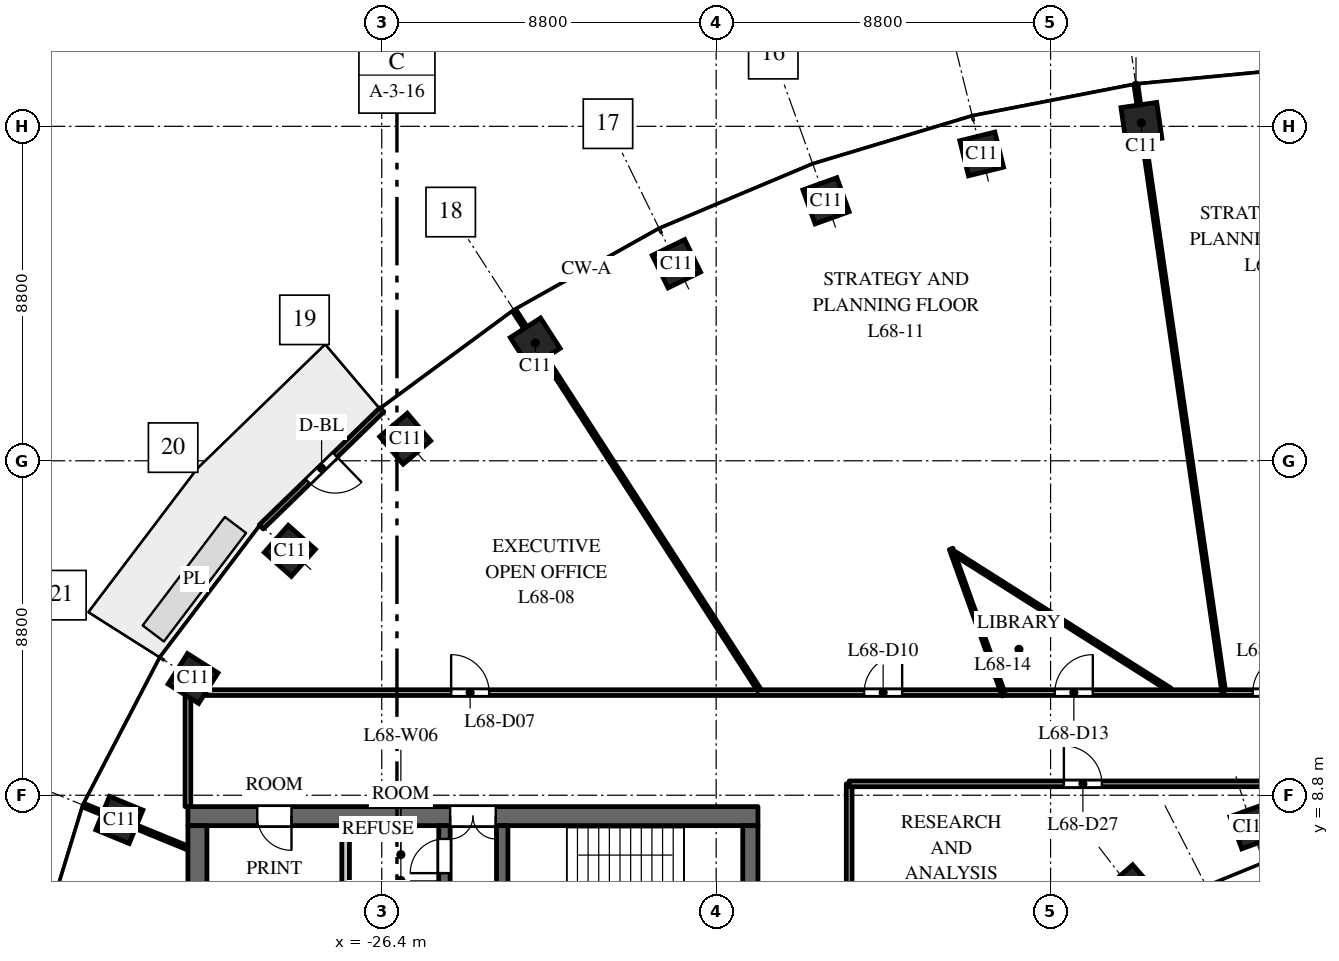
"""IFC4 building model, lengths in metres.
Left out: names, types, materials, properties, quantities, classifications, styles, units other than length and angle.
Written with IfcOpenShell. Run it as: python <this file> out.ifc"""

import sys

from ifc_helpers import new_model, si_unit, direction, frame, frame_2d, origin, origin_2d, place, context, subcontext, project, spatial, rectangle, extrude, element, fill, save


model = new_model("IFC4")
c1 = context("Model", 3, precision=1e-05, world=origin(), true_north=direction((0.0, 1.0)))
c2 = subcontext(c1, "Body", "Model", "MODEL_VIEW")
j1 = project(units=[si_unit("LENGTHUNIT", "METRE"), si_unit("PLANEANGLEUNIT", "RADIAN")], contexts=[c1])
p1 = place(None, origin())
s1 = spatial("IfcSite", under=j1, at=p1, CompositionType="ELEMENT")
p2 = place(p1, origin())
s2 = spatial("IfcBuilding", under=s1, at=p2, CompositionType="ELEMENT")
p3 = place(p2, frame((0.0, 0.0, 315.0)))
s3 = spatial("IfcBuildingStorey", under=s2, at=p3, CompositionType="ELEMENT", Elevation=315.0)
for number, where, z_axis, x_axis in (
    (1, (-6.409, 26.491, 0.0), (0.0, 0.0, 1.0), (-0.99, -0.143, 0.0)),
    (2, (-10.613, 25.674, 0.0), (0.0, 0.0, 1.0), (-0.971, -0.24, 0.0)),
    (3, (-14.709, 24.441, 0.0), (0.0, 0.0, 1.0), (-0.941, -0.338, 0.0)),
    (4, (-18.646, 22.785, 0.0), (0.0, 0.0, 1.0), (-0.898, -0.439, 0.0)),
    (5, (-22.362, 20.7, 0.0), (0.0, 0.0, 1.0), (-0.84, -0.542, 0.0)),
    (6, (-25.783, 18.18, 0.0), (0.0, 0.0, 1.0), (-0.763, -0.646, 0.0)),
    (7, (-28.819, 15.23, 0.0), (0.0, 0.0, 1.0), (-0.663, -0.749, 0.0)),
    (8, (-31.365, 11.871, 0.0), (0.0, 0.0, 1.0), (-0.535, -0.845, 0.0)),
    (9, (-33.305, 8.149, 0.0), (0.0, 0.0, 1.0), (-0.379, -0.925, 0.0)),
):
    element("IfcColumn", number, at=place(p3, frame(where, z_axis=z_axis, x_axis=x_axis)), inside=s3, PredefinedType="COLUMN", context=c2, shape_type="SweptSolid", body=[
        extrude(rectangle(XDim=0.95, YDim=0.95, at=origin_2d()), origin(), (0.0, 0.0, 1.0), 4.0),
    ])
for number, where, z_axis, x_axis in (
    (10, (-3.501, 7.967, 0.0), (0.0, 0.0, 1.0), (-0.939, -0.344, 0.0)),
    (11, (-6.682, 6.334, 0.0), (0.0, 0.0, 1.0), (-0.751, -0.66, 0.0)),
):
    element("IfcColumn", number, at=place(p3, frame(where, z_axis=z_axis, x_axis=x_axis)), inside=s3, PredefinedType="COLUMN", context=c2, shape_type="SweptSolid", body=[
        extrude(rectangle(XDim=0.9, YDim=0.9, at=origin_2d()), origin(), (0.0, 0.0, 1.0), 4.0),
    ])
p4 = place(p3, frame((-16.5, 8.25, 0.0), z_axis=(0.0, 0.0, 1.0), x_axis=(-1.0, 0.0, 0.0)))
e12 = element("IfcWall", 12, at=p4, inside=s3, PredefinedType="SHEAR", context=c2, shape_type="SweptSolid", body=[
    extrude(rectangle(XDim=15.0, YDim=0.5, at=frame_2d((7.5, 0.0))), origin(), (0.0, 0.0, 1.0), 3.7),
])
p5 = place(p4, frame((6.9, 0.0, 0.0)))
e13 = element("IfcOpeningElement", 13, at=p5, cuts=e12, PredefinedType="OPENING", context=c2, shape_type="SweptSolid", body=[
    extrude(rectangle(XDim=1.2, YDim=2.1, at=frame_2d((0.6, 1.05))), frame((0.0, 0.26, 0.0), z_axis=(0.0, -1.0, 0.0), x_axis=(1.0, 0.0, 0.0)), (0.0, 0.0, 1.0), 0.52),
])
p6 = place(p4, frame((12.275, 0.0, 0.0)))
e14 = element("IfcOpeningElement", 14, at=p6, cuts=e12, PredefinedType="OPENING", context=c2, shape_type="SweptSolid", body=[
    extrude(rectangle(XDim=0.9, YDim=2.1, at=frame_2d((0.45, 1.05))), frame((0.0, 0.26, 0.0), z_axis=(0.0, -1.0, 0.0), x_axis=(1.0, 0.0, 0.0)), (0.0, 0.0, 1.0), 0.52),
])
p7 = place(p3, frame((-24.75, -8.0, 0.0), z_axis=(0.0, 0.0, 1.0), x_axis=(0.0, 1.0, 0.0)))
e15 = element("IfcWall", 15, at=p7, inside=s3, PredefinedType="SHEAR", context=c2, shape_type="SweptSolid", body=[
    extrude(rectangle(XDim=16.0, YDim=0.3, at=frame_2d((8.0, 0.0))), origin(), (0.0, 0.0, 1.0), 3.7),
])
p8 = place(p7, frame((4.425, 0.0, 0.0)))
e16 = element("IfcOpeningElement", 16, at=p8, cuts=e15, PredefinedType="OPENING", context=c2, shape_type="SweptSolid", body=[
    extrude(rectangle(XDim=1.1, YDim=2.1, at=frame_2d((0.55, 1.05))), frame((0.0, 0.16, 0.0), z_axis=(0.0, -1.0, 0.0), x_axis=(1.0, 0.0, 0.0)), (0.0, 0.0, 1.0), 0.32),
])
p9 = place(p7, frame((7.45, 0.0, 0.0)))
e17 = element("IfcOpeningElement", 17, at=p9, cuts=e15, PredefinedType="OPENING", context=c2, shape_type="SweptSolid", body=[
    extrude(rectangle(XDim=1.1, YDim=2.1, at=frame_2d((0.55, 1.05))), frame((0.0, 0.16, 0.0), z_axis=(0.0, -1.0, 0.0), x_axis=(1.0, 0.0, 0.0)), (0.0, 0.0, 1.0), 0.32),
])
p10 = place(p7, frame((10.575, 0.0, 0.0)))
e18 = element("IfcOpeningElement", 18, at=p10, cuts=e15, PredefinedType="OPENING", context=c2, shape_type="SweptSolid", body=[
    extrude(rectangle(XDim=0.9, YDim=2.1, at=frame_2d((0.45, 1.05))), frame((0.0, 0.16, 0.0), z_axis=(0.0, -1.0, 0.0), x_axis=(1.0, 0.0, 0.0)), (0.0, 0.0, 1.0), 0.32),
])
p11 = place(p7, frame((13.125, 0.0, 0.0)))
e19 = element("IfcOpeningElement", 19, at=p11, cuts=e15, PredefinedType="OPENING", context=c2, shape_type="SweptSolid", body=[
    extrude(rectangle(XDim=0.9, YDim=2.1, at=frame_2d((0.45, 1.05))), frame((0.0, 0.16, 0.0), z_axis=(0.0, -1.0, 0.0), x_axis=(1.0, 0.0, 0.0)), (0.0, 0.0, 1.0), 0.32),
])
p12 = place(p7, frame((14.75, 0.0, 0.0)))
e20 = element("IfcOpeningElement", 20, at=p12, cuts=e15, PredefinedType="OPENING", context=c2, shape_type="SweptSolid", body=[
    extrude(rectangle(XDim=0.9, YDim=2.1, at=frame_2d((0.45, 1.05))), frame((0.0, 0.16, 0.0), z_axis=(0.0, -1.0, 0.0), x_axis=(1.0, 0.0, 0.0)), (0.0, 0.0, 1.0), 0.32),
])
p13 = place(p7, frame((1.35, 0.0, 0.0)))
e21 = element("IfcOpeningElement", 21, at=p13, cuts=e15, PredefinedType="OPENING", context=c2, shape_type="SweptSolid", body=[
    extrude(rectangle(XDim=0.9, YDim=2.1, at=frame_2d((0.45, 1.05))), frame((0.0, 0.16, 0.0), z_axis=(0.0, -1.0, 0.0), x_axis=(1.0, 0.0, 0.0)), (0.0, 0.0, 1.0), 0.32),
])
p14 = place(p3, frame((-16.7, -8.0, 0.0), z_axis=(0.0, 0.0, 1.0), x_axis=(0.0, 1.0, 0.0)))
e22 = element("IfcWall", 22, at=p14, inside=s3, PredefinedType="SHEAR", context=c2, shape_type="SweptSolid", body=[
    extrude(rectangle(XDim=16.0, YDim=0.4, at=frame_2d((8.0, 0.0))), origin(), (0.0, 0.0, 1.0), 3.7),
])
p15 = place(p3, frame((-31.25, -8.0, 0.0), z_axis=(0.0, 0.0, 1.0), x_axis=(0.0, 1.0, 0.0)))
e23 = element("IfcWall", 23, at=p15, inside=s3, PredefinedType="SHEAR", context=c2, shape_type="SweptSolid", body=[
    extrude(rectangle(XDim=16.0, YDim=0.5, at=frame_2d((8.0, 0.0))), origin(), (0.0, 0.0, 1.0), 3.7),
])
p16 = place(p3, frame((-27.35, 4.75, 0.0), z_axis=(0.0, 0.0, 1.0), x_axis=(0.0, 1.0, 0.0)))
e24 = element("IfcWall", 24, at=p16, inside=s3, PredefinedType="PARTITIONING", context=c2, shape_type="SweptSolid", body=[
    extrude(rectangle(XDim=3.25, YDim=0.2, at=frame_2d((1.625, 0.0))), origin(), (0.0, 0.0, 1.0), 3.7),
])
p17 = place(p3, frame((-23.23, 2.25, 0.0), z_axis=(0.0, 0.0, 1.0), x_axis=(0.0, 1.0, 0.0)))
e25 = element("IfcWall", 25, at=p17, inside=s3, PredefinedType="SHEAR", context=c2, shape_type="SweptSolid", body=[
    extrude(rectangle(XDim=5.75, YDim=0.3, at=frame_2d((2.875, 0.0))), origin(), (0.0, 0.0, 1.0), 3.7),
])
p18 = place(p17, frame((0.6, 0.0, 0.0)))
e26 = element("IfcOpeningElement", 26, at=p18, cuts=e25, PredefinedType="OPENING", context=c2, shape_type="SweptSolid", body=[
    extrude(rectangle(XDim=1.0, YDim=2.1, at=frame_2d((0.5, 1.05))), frame((0.0, 0.16, 0.0), z_axis=(0.0, -1.0, 0.0), x_axis=(1.0, 0.0, 0.0)), (0.0, 0.0, 1.0), 0.32),
])
p19 = place(p3, frame((-26.396, 18.943, 0.0), z_axis=(0.0, 0.0, 1.0), x_axis=(-0.717214761864, -0.696852197647, 0.0)))
e27 = element("IfcWall", 27, at=p19, inside=s3, PredefinedType="STANDARD", context=c2, shape_type="SweptSolid", body=[
    extrude(rectangle(XDim=4.424, YDim=0.15, at=frame_2d((2.212, 0.0))), origin(), (0.0, 0.0, 1.0), 3.7),
])
p20 = place(p19, frame((1.712, 0.0, 0.0)))
e28 = element("IfcOpeningElement", 28, at=p20, cuts=e27, PredefinedType="OPENING", context=c2, shape_type="SweptSolid", body=[
    extrude(rectangle(XDim=1.0, YDim=2.4, at=frame_2d((0.5, 1.2))), frame((0.0, 0.085, 0.0), z_axis=(0.0, -1.0, 0.0), x_axis=(1.0, 0.0, 0.0)), (0.0, 0.0, 1.0), 0.17),
])
p21 = place(p3, frame((-34.234, 8.53, 0.0), z_axis=(0.0, 0.0, 1.0), x_axis=(0.925344112436, -0.379128307542, 0.0)))
e29 = element("IfcWall", 29, at=p21, inside=s3, PredefinedType="PARTITIONING", context=c2, shape_type="SweptSolid", body=[
    extrude(rectangle(XDim=2.954, YDim=0.1, at=frame_2d((1.477, 0.0))), origin(), (0.0, 0.0, 1.0), 3.0),
])
p22 = place(p3, frame((-31.5, 8.5, 0.0), z_axis=(0.0, 0.0, 1.0), x_axis=(0.0, 1.0, 0.0)))
e30 = element("IfcWall", 30, at=p22, inside=s3, PredefinedType="PARTITIONING", context=c2, shape_type="SweptSolid", body=[
    extrude(rectangle(XDim=3.0, YDim=0.15, at=frame_2d((1.5, 0.0))), origin(), (0.0, 0.0, 1.0), 3.0),
])
p23 = place(p3, frame((-31.5, 11.5, 0.0), z_axis=(0.0, 0.0, 1.0), x_axis=(1.0, 0.0, 0.0)))
e31 = element("IfcWall", 31, at=p23, inside=s3, PredefinedType="PARTITIONING", context=c2, shape_type="SweptSolid", body=[
    extrude(rectangle(XDim=21.432, YDim=0.15, at=frame_2d((10.716, 0.0))), origin(), (0.0, 0.0, 1.0), 2.75),
])
p24 = place(p23, frame((6.926, 0.0, 0.0)))
e32 = element("IfcOpeningElement", 32, at=p24, cuts=e31, PredefinedType="OPENING", context=c2, shape_type="SweptSolid", body=[
    extrude(rectangle(XDim=1.0, YDim=2.1, at=frame_2d((0.5, 1.05))), frame((0.0, 0.085, 0.0), z_axis=(0.0, -1.0, 0.0), x_axis=(1.0, 0.0, 0.0)), (0.0, 0.0, 1.0), 0.17),
])
p25 = place(p23, frame((17.794, 0.0, 0.0)))
e33 = element("IfcOpeningElement", 33, at=p25, cuts=e31, PredefinedType="OPENING", context=c2, shape_type="SweptSolid", body=[
    extrude(rectangle(XDim=1.0, YDim=2.1, at=frame_2d((0.5, 1.05))), frame((0.0, 0.085, 0.0), z_axis=(0.0, -1.0, 0.0), x_axis=(1.0, 0.0, 0.0)), (0.0, 0.0, 1.0), 0.17),
])
p26 = place(p3, frame((-22.905, 21.542, 0.0), z_axis=(0.0, 0.0, 1.0), x_axis=(0.54229092728, -0.840190782019, 0.0)))
e34 = element("IfcWall", 34, at=p26, inside=s3, PredefinedType="PARTITIONING", context=c2, shape_type="SweptSolid", body=[
    extrude(rectangle(XDim=11.863, YDim=0.1, at=frame_2d((5.931, 0.0))), origin(), (0.0, 0.0, 1.0), 2.75),
])
p27 = place(p3, frame((-14.1, 4.55, 0.0), z_axis=(0.0, 0.0, 1.0), x_axis=(0.0, 1.0, 0.0)))
e35 = element("IfcWall", 35, at=p27, inside=s3, PredefinedType="PARTITIONING", context=c2, shape_type="SweptSolid", body=[
    extrude(rectangle(XDim=4.55, YDim=0.15, at=frame_2d((2.275, 0.0))), origin(), (0.0, 0.0, 1.0), 3.7),
])
p28 = place(p3, frame((-14.1, 9.1, 0.0), z_axis=(0.0, 0.0, 1.0), x_axis=(1.0, 0.0, 0.0)))
e36 = element("IfcWall", 36, at=p28, inside=s3, PredefinedType="PARTITIONING", context=c2, shape_type="SweptSolid", body=[
    extrude(rectangle(XDim=12.3, YDim=0.15, at=frame_2d((6.15, 0.0))), origin(), (0.0, 0.0, 1.0), 2.75),
])
p29 = place(p28, frame((5.65, 0.0, 0.0)))
e37 = element("IfcOpeningElement", 37, at=p29, cuts=e36, PredefinedType="OPENING", context=c2, shape_type="SweptSolid", body=[
    extrude(rectangle(XDim=1.0, YDim=2.1, at=frame_2d((0.5, 1.05))), frame((0.0, 0.085, 0.0), z_axis=(0.0, -1.0, 0.0), x_axis=(1.0, 0.0, 0.0)), (0.0, 0.0, 1.0), 0.17),
])
p30 = place(p3, frame((-11.416, 15.282, 0.0), z_axis=(0.0, 0.0, 1.0), x_axis=(0.33848088015, -0.940973269425, 0.0)))
e38 = element("IfcWall", 38, at=p30, inside=s3, PredefinedType="PARTITIONING", context=c2, shape_type="SweptSolid", body=[
    extrude(rectangle(XDim=4.095, YDim=0.1, at=frame_2d((2.047, 0.0))), origin(), (0.0, 0.0, 1.0), 2.75),
])
p31 = place(p3, frame((-11.319, 15.161, 0.0), z_axis=(0.0, 0.0, 1.0), x_axis=(0.844865171483, -0.534979291203, 0.0)))
e39 = element("IfcWall", 39, at=p31, inside=s3, PredefinedType="PARTITIONING", context=c2, shape_type="SweptSolid", body=[
    extrude(rectangle(XDim=6.703, YDim=0.1, at=frame_2d((3.352, 0.0))), origin(), (0.0, 0.0, 1.0), 3.7),
])
p32 = place(p3, frame((-10.003, 11.5, 0.0), z_axis=(0.0, 0.0, 1.0), x_axis=(1.0, 0.0, 0.0)))
e40 = element("IfcWall", 40, at=p32, inside=s3, PredefinedType="PARTITIONING", context=c2, shape_type="SweptSolid", body=[
    extrude(rectangle(XDim=5.741, YDim=0.15, at=frame_2d((2.871, 0.0))), origin(), (0.0, 0.0, 1.0), 2.75),
])
p33 = place(p32, frame((1.315, 0.0, 0.0)))
e41 = element("IfcOpeningElement", 41, at=p33, cuts=e40, PredefinedType="OPENING", context=c2, shape_type="SweptSolid", body=[
    extrude(rectangle(XDim=1.0, YDim=2.1, at=frame_2d((0.5, 1.05))), frame((0.0, 0.085, 0.0), z_axis=(0.0, -1.0, 0.0), x_axis=(1.0, 0.0, 0.0)), (0.0, 0.0, 1.0), 0.17),
])
p34 = place(p3, frame((-6.552, 27.481, 0.0), z_axis=(0.0, 0.0, 1.0), x_axis=(0.143123019969, -0.989704906098, 0.0)))
e42 = element("IfcWall", 42, at=p34, inside=s3, PredefinedType="PARTITIONING", context=c2, shape_type="SweptSolid", body=[
    extrude(rectangle(XDim=16.147, YDim=0.1, at=frame_2d((8.074, 0.0))), origin(), (0.0, 0.0, 1.0), 3.0),
])
p35 = place(p3, frame((-4.242, 11.5, 0.0), z_axis=(0.0, 0.0, 1.0), x_axis=(1.0, 0.0, 0.0)))
e43 = element("IfcWall", 43, at=p35, inside=s3, PredefinedType="PARTITIONING", context=c2, shape_type="SweptSolid", body=[
    extrude(rectangle(XDim=2.751, YDim=0.15, at=frame_2d((1.375, 0.0))), origin(), (0.0, 0.0, 1.0), 3.7),
])
p36 = place(p35, frame((0.762, 0.0, 0.0)))
e44 = element("IfcOpeningElement", 44, at=p36, cuts=e43, PredefinedType="OPENING", context=c2, shape_type="SweptSolid", body=[
    extrude(rectangle(XDim=1.0, YDim=2.1, at=frame_2d((0.5, 1.05))), frame((0.0, 0.085, 0.0), z_axis=(0.0, -1.0, 0.0), x_axis=(1.0, 0.0, 0.0)), (0.0, 0.0, 1.0), 0.17),
])
p37 = place(p5, origin())
e45 = element("IfcDoor", 45, at=p37, inside=s3, OperationType="DOUBLE_DOOR_DOUBLE_SWING", PredefinedType="DOOR", context=c2, shape_type="SweptSolid", body=[
    extrude(rectangle(XDim=1.2, YDim=2.1, at=frame_2d((0.6, 1.05))), frame((0.0, 0.025, 0.0), z_axis=(0.0, -1.0, 0.0), x_axis=(1.0, 0.0, 0.0)), (0.0, 0.0, 1.0), 0.05),
])
fill(e13, e45)
p38 = place(p12, origin())
e46 = element("IfcDoor", 46, at=p38, inside=s3, OperationType="SINGLE_SWING_RIGHT", PredefinedType="DOOR", context=c2, shape_type="SweptSolid", body=[
    extrude(rectangle(XDim=0.9, YDim=2.1, at=frame_2d((0.45, 1.05))), frame((0.0, 0.025, 0.0), z_axis=(0.0, -1.0, 0.0), x_axis=(1.0, 0.0, 0.0)), (0.0, 0.0, 1.0), 0.05),
])
fill(e20, e46)
p39 = place(p6, origin())
e47 = element("IfcDoor", 47, at=p39, inside=s3, OperationType="SINGLE_SWING_RIGHT", PredefinedType="DOOR", context=c2, shape_type="SweptSolid", body=[
    extrude(rectangle(XDim=0.9, YDim=2.1, at=frame_2d((0.45, 1.05))), frame((0.0, 0.025, 0.0), z_axis=(0.0, -1.0, 0.0), x_axis=(1.0, 0.0, 0.0)), (0.0, 0.0, 1.0), 0.05),
])
fill(e14, e47)
p40 = place(p20, origin())
e48 = element("IfcDoor", 48, at=p40, inside=s3, OperationType="SINGLE_SWING_LEFT", PredefinedType="DOOR", context=c2, shape_type="SweptSolid", body=[
    extrude(rectangle(XDim=1.0, YDim=2.4, at=frame_2d((0.5, 1.2))), frame((0.0, 0.025, 0.0), z_axis=(0.0, -1.0, 0.0), x_axis=(1.0, 0.0, 0.0)), (0.0, 0.0, 1.0), 0.05),
])
fill(e28, e48)
p41 = place(p24, origin())
e49 = element("IfcDoor", 49, at=p41, inside=s3, OperationType="SINGLE_SWING_LEFT", PredefinedType="DOOR", context=c2, shape_type="SweptSolid", body=[
    extrude(rectangle(XDim=1.0, YDim=2.1, at=frame_2d((0.5, 1.05))), frame((0.0, 0.025, 0.0), z_axis=(0.0, -1.0, 0.0), x_axis=(1.0, 0.0, 0.0)), (0.0, 0.0, 1.0), 0.05),
])
fill(e32, e49)
p42 = place(p25, origin())
e50 = element("IfcDoor", 50, at=p42, inside=s3, OperationType="SINGLE_SWING_RIGHT", PredefinedType="DOOR", context=c2, shape_type="SweptSolid", body=[
    extrude(rectangle(XDim=1.0, YDim=2.1, at=frame_2d((0.5, 1.05))), frame((0.0, 0.025, 0.0), z_axis=(0.0, -1.0, 0.0), x_axis=(1.0, 0.0, 0.0)), (0.0, 0.0, 1.0), 0.05),
])
fill(e33, e50)
p43 = place(p33, origin())
e51 = element("IfcDoor", 51, at=p43, inside=s3, OperationType="SINGLE_SWING_RIGHT", PredefinedType="DOOR", context=c2, shape_type="SweptSolid", body=[
    extrude(rectangle(XDim=1.0, YDim=2.1, at=frame_2d((0.5, 1.05))), frame((0.0, 0.025, 0.0), z_axis=(0.0, -1.0, 0.0), x_axis=(1.0, 0.0, 0.0)), (0.0, 0.0, 1.0), 0.05),
])
fill(e41, e51)
p44 = place(p36, origin())
e52 = element("IfcDoor", 52, at=p44, inside=s3, OperationType="SINGLE_SWING_RIGHT", PredefinedType="DOOR", context=c2, shape_type="SweptSolid", body=[
    extrude(rectangle(XDim=1.0, YDim=2.1, at=frame_2d((0.5, 1.05))), frame((0.0, 0.025, 0.0), z_axis=(0.0, -1.0, 0.0), x_axis=(1.0, 0.0, 0.0)), (0.0, 0.0, 1.0), 0.05),
])
fill(e44, e52)
p45 = place(p29, origin())
e53 = element("IfcDoor", 53, at=p45, inside=s3, OperationType="SINGLE_SWING_LEFT", PredefinedType="DOOR", context=c2, shape_type="SweptSolid", body=[
    extrude(rectangle(XDim=1.0, YDim=2.1, at=frame_2d((0.5, 1.05))), frame((0.0, 0.025, 0.0), z_axis=(0.0, -1.0, 0.0), x_axis=(1.0, 0.0, 0.0)), (0.0, 0.0, 1.0), 0.05),
])
fill(e37, e53)
save(model, sys.argv[1])
